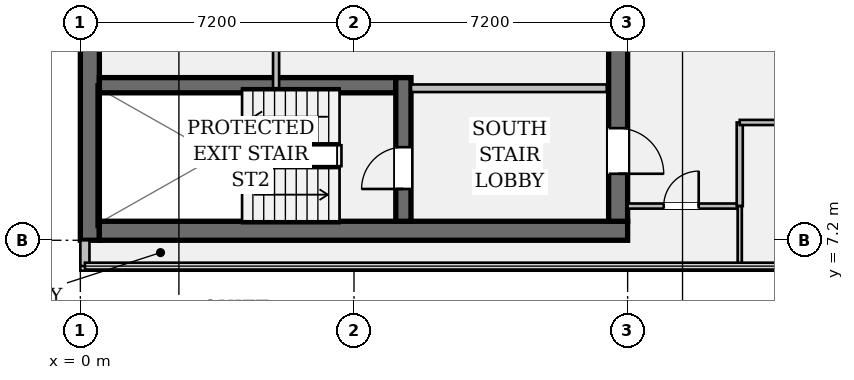
"""IFC4 building model, lengths in metres.
Left out: names, types, materials, properties, quantities, classifications, styles, units other than length and angle.
Written with IfcOpenShell. Run it as: python <this file> out.ifc"""

import sys

from ifc_helpers import new_model, si_unit, direction, frame, frame_2d, origin, place, context, subcontext, project, spatial, rectangle, extrude, element, fill, save


model = new_model("IFC4")
c1 = context("Model", 3, precision=1e-05, world=origin(), true_north=direction((0.0, 1.0)))
c2 = subcontext(c1, "Body", "Model", "MODEL_VIEW")
j1 = project(units=[si_unit("LENGTHUNIT", "METRE"), si_unit("PLANEANGLEUNIT", "RADIAN")], contexts=[c1])
p1 = place(None, origin())
s1 = spatial("IfcSite", under=j1, at=p1, CompositionType="ELEMENT")
p2 = place(p1, origin())
s2 = spatial("IfcBuilding", under=s1, at=p2, CompositionType="ELEMENT")
p3 = place(p2, frame((0.0, 0.0, 244.65)))
s3 = spatial("IfcBuildingStorey", under=s2, at=p3, CompositionType="ELEMENT", Elevation=244.65)
p4 = place(p3, frame((0.25, 7.2, 0.0), z_axis=(0.0, 0.0, 1.0), x_axis=(0.0, 1.0, 0.0)))
e1 = element("IfcWall", 1, at=p4, inside=s3, PredefinedType="SHEAR", context=c2, shape_type="SweptSolid", body=[
    extrude(rectangle(XDim=28.8, YDim=0.5, at=frame_2d((14.4, 0.0))), origin(), (0.0, 0.0, 1.0), 3.24),
])
p5 = place(p3, frame((0.5, 7.45, 0.0), z_axis=(0.0, 0.0, 1.0), x_axis=(1.0, 0.0, 0.0)))
e2 = element("IfcWall", 2, at=p5, inside=s3, PredefinedType="SHEAR", context=c2, shape_type="SweptSolid", body=[
    extrude(rectangle(XDim=13.9, YDim=0.5, at=frame_2d((6.95, 0.0))), origin(), (0.0, 0.0, 1.0), 3.24),
])
p6 = place(p3, frame((14.15, 35.5, 0.0), z_axis=(0.0, 0.0, 1.0), x_axis=(0.0, -1.0, 0.0)))
e3 = element("IfcWall", 3, at=p6, inside=s3, PredefinedType="SHEAR", context=c2, shape_type="SweptSolid", body=[
    extrude(rectangle(XDim=27.8, YDim=0.5, at=frame_2d((13.9, 0.0))), origin(), (0.0, 0.0, 1.0), 3.24),
])
p7 = place(p6, frame((1.4, 0.0, 0.0)))
e4 = element("IfcOpeningElement", 4, at=p7, cuts=e3, PredefinedType="OPENING", context=c2, shape_type="SweptSolid", body=[
    extrude(rectangle(XDim=1.2, YDim=2.15, at=frame_2d((0.6, 1.075))), frame((0.0, 0.262, 0.0), z_axis=(0.0, -1.0, 0.0), x_axis=(1.0, 0.0, 0.0)), (0.0, 0.0, 1.0), 0.524),
])
p8 = place(p6, frame((25.35, 0.0, 0.0)))
e5 = element("IfcOpeningElement", 5, at=p8, cuts=e3, PredefinedType="OPENING", context=c2, shape_type="SweptSolid", body=[
    extrude(rectangle(XDim=1.2, YDim=2.15, at=frame_2d((0.6, 1.075))), frame((0.0, 0.262, 0.0), z_axis=(0.0, -1.0, 0.0), x_axis=(1.0, 0.0, 0.0)), (0.0, 0.0, 1.0), 0.524),
])
p9 = place(p6, frame((14.7, 0.0, 0.0)))
e6 = element("IfcOpeningElement", 6, at=p9, cuts=e3, PredefinedType="OPENING", context=c2, shape_type="SweptSolid", body=[
    extrude(rectangle(XDim=1.6, YDim=2.2, at=frame_2d((0.8, 1.1))), frame((0.0, 0.262, 0.0), z_axis=(0.0, -1.0, 0.0), x_axis=(1.0, 0.0, 0.0)), (0.0, 0.0, 1.0), 0.524),
])
p10 = place(p3, frame((0.5, 11.28, 0.0), z_axis=(0.0, 0.0, 1.0), x_axis=(1.0, 0.0, 0.0)))
e7 = element("IfcWall", 7, at=p10, inside=s3, PredefinedType="SHEAR", context=c2, shape_type="SweptSolid", body=[
    extrude(rectangle(XDim=7.8, YDim=0.4, at=frame_2d((3.9, 0.0))), origin(), (0.0, 0.0, 1.0), 3.24),
])
p11 = place(p3, frame((8.5, 7.7, 0.0), z_axis=(0.0, 0.0, 1.0), x_axis=(0.0, 1.0, 0.0)))
e8 = element("IfcWall", 8, at=p11, inside=s3, PredefinedType="SHEAR", context=c2, shape_type="SweptSolid", body=[
    extrude(rectangle(XDim=3.78, YDim=0.4, at=frame_2d((1.89, 0.0))), origin(), (0.0, 0.0, 1.0), 3.24),
])
p12 = place(p11, frame((0.85, 0.0, 0.0)))
e9 = element("IfcOpeningElement", 9, at=p12, cuts=e8, PredefinedType="OPENING", context=c2, shape_type="SweptSolid", body=[
    extrude(rectangle(XDim=1.1, YDim=2.15, at=frame_2d((0.55, 1.075))), frame((0.0, 0.212, 0.0), z_axis=(0.0, -1.0, 0.0), x_axis=(1.0, 0.0, 0.0)), (0.0, 0.0, 1.0), 0.424),
])
p13 = place(p3, frame((0.12, 6.52, 0.0), z_axis=(0.0, 0.0, 1.0), x_axis=(0.0, 1.0, 0.0)))
e10 = element("IfcWall", 10, at=p13, inside=s3, PredefinedType="STANDARD", context=c2, shape_type="SweptSolid", body=[
    extrude(rectangle(XDim=0.68, YDim=0.24, at=frame_2d((0.34, 0.0))), origin(), (0.0, 0.0, 1.0), 3.24),
])
p14 = place(p3, frame((8.7, 11.2, 0.0), z_axis=(0.0, 0.0, 1.0), x_axis=(1.0, 0.0, 0.0)))
e11 = element("IfcWall", 11, at=p14, inside=s3, PredefinedType="PARTITIONING", context=c2, shape_type="SweptSolid", body=[
    extrude(rectangle(XDim=5.15, YDim=0.2, at=frame_2d((2.575, 0.0))), origin(), (0.0, 0.0, 1.0), 3.24),
])
p15 = place(p3, frame((5.15, 11.2, 0.0), z_axis=(0.0, 0.0, 1.0), x_axis=(0.0, 1.0, 0.0)))
e12 = element("IfcWall", 12, at=p15, inside=s3, PredefinedType="PARTITIONING", context=c2, shape_type="SweptSolid", body=[
    extrude(rectangle(XDim=6.6, YDim=0.16, at=frame_2d((3.3, 0.0))), origin(), (0.0, 0.0, 1.0), 3.24),
])
p16 = place(p3, frame((14.4, 8.1, 0.0), z_axis=(0.0, 0.0, 1.0), x_axis=(1.0, 0.0, 0.0)))
e13 = element("IfcWall", 13, at=p16, inside=s3, PredefinedType="PARTITIONING", context=c2, shape_type="SweptSolid", body=[
    extrude(rectangle(XDim=2.95, YDim=0.135, at=frame_2d((1.475, 0.0))), origin(), (0.0, 0.0, 1.0), 3.24),
])
p17 = place(p16, frame((0.95, 0.0, 0.0)))
e14 = element("IfcOpeningElement", 14, at=p17, cuts=e13, PredefinedType="OPENING", context=c2, shape_type="SweptSolid", body=[
    extrude(rectangle(XDim=0.92, YDim=2.15, at=frame_2d((0.46, 1.075))), frame((0.0, 0.08, 0.0), z_axis=(0.0, -1.0, 0.0), x_axis=(1.0, 0.0, 0.0)), (0.0, 0.0, 1.0), 0.159),
])
p18 = place(p3, frame((17.35, 8.1, 0.0), z_axis=(0.0, 0.0, 1.0), x_axis=(0.0, 1.0, 0.0)))
e15 = element("IfcWall", 15, at=p18, inside=s3, PredefinedType="PARTITIONING", context=c2, shape_type="SweptSolid", body=[
    extrude(rectangle(XDim=2.2, YDim=0.16, at=frame_2d((1.1, 0.0))), origin(), (0.0, 0.0, 1.0), 3.24),
])
p19 = place(p3, frame((17.35, 10.3, 0.0), z_axis=(0.0, 0.0, 1.0), x_axis=(1.0, 0.0, 0.0)))
e16 = element("IfcWall", 16, at=p19, inside=s3, PredefinedType="PARTITIONING", context=c2, shape_type="SweptSolid", body=[
    extrude(rectangle(XDim=6.6, YDim=0.135, at=frame_2d((3.3, 0.0))), origin(), (0.0, 0.0, 1.0), 2.676),
])
p20 = place(p19, frame((2.8, 0.0, 0.0)))
e17 = element("IfcOpeningElement", 17, at=p20, cuts=e16, PredefinedType="OPENING", context=c2, shape_type="SweptSolid", body=[
    extrude(rectangle(XDim=0.92, YDim=2.15, at=frame_2d((0.46, 1.075))), frame((0.0, 0.08, 0.0), z_axis=(0.0, -1.0, 0.0), x_axis=(1.0, 0.0, 0.0)), (0.0, 0.0, 1.0), 0.159),
])
p21 = place(p3, frame((17.35, 6.52, 0.0), z_axis=(0.0, 0.0, 1.0), x_axis=(0.0, 1.0, 0.0)))
e18 = element("IfcWall", 18, at=p21, inside=s3, PredefinedType="PARTITIONING", context=c2, shape_type="SweptSolid", body=[
    extrude(rectangle(XDim=1.58, YDim=0.11, at=frame_2d((0.79, 0.0))), origin(), (0.0, 0.0, 1.0), 3.24),
])
p22 = place(p12, origin())
e19 = element("IfcDoor", 19, at=p22, inside=s3, OperationType="SINGLE_SWING_LEFT", PredefinedType="DOOR", context=c2, shape_type="SweptSolid", body=[
    extrude(rectangle(XDim=1.1, YDim=2.15, at=frame_2d((0.55, 1.075))), frame((0.0, 0.025, 0.0), z_axis=(0.0, -1.0, 0.0), x_axis=(1.0, 0.0, 0.0)), (0.0, 0.0, 1.0), 0.05),
])
fill(e9, e19)
p23 = place(p8, origin())
e20 = element("IfcDoor", 20, at=p23, inside=s3, OperationType="SINGLE_SWING_RIGHT", PredefinedType="DOOR", context=c2, shape_type="SweptSolid", body=[
    extrude(rectangle(XDim=1.2, YDim=2.15, at=frame_2d((0.6, 1.075))), frame((0.0, 0.025, 0.0), z_axis=(0.0, -1.0, 0.0), x_axis=(1.0, 0.0, 0.0)), (0.0, 0.0, 1.0), 0.05),
])
fill(e5, e20)
p24 = place(p17, origin())
e21 = element("IfcDoor", 21, at=p24, inside=s3, OperationType="SINGLE_SWING_RIGHT", PredefinedType="DOOR", context=c2, shape_type="SweptSolid", body=[
    extrude(rectangle(XDim=0.92, YDim=2.15, at=frame_2d((0.46, 1.075))), frame((0.0, 0.025, 0.0), z_axis=(0.0, -1.0, 0.0), x_axis=(1.0, 0.0, 0.0)), (0.0, 0.0, 1.0), 0.05),
])
fill(e14, e21)
save(model, sys.argv[1])
